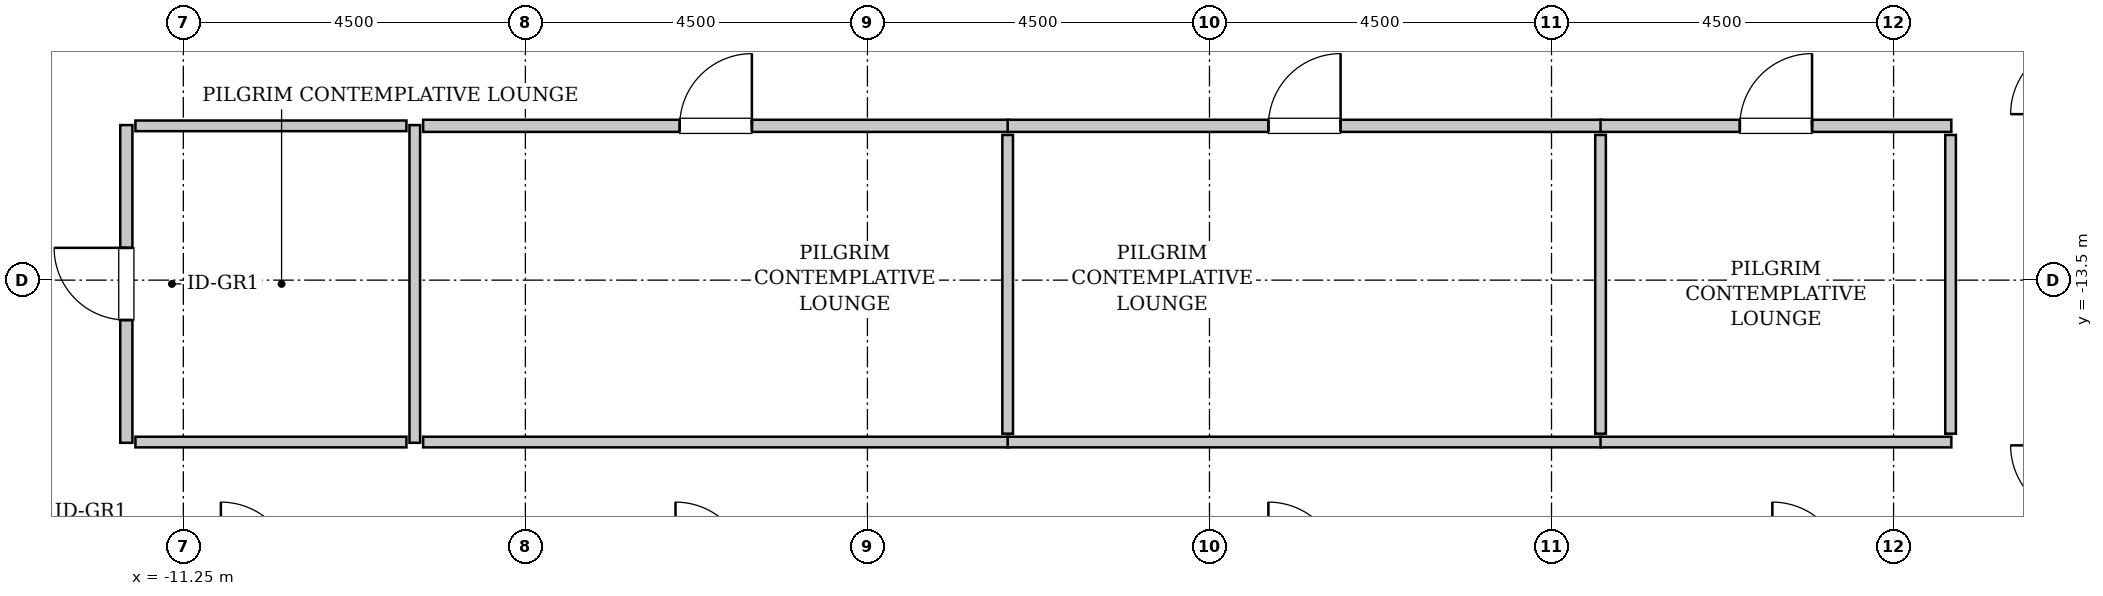
"""IFC4 building model, lengths in metres.
Left out: names, types, materials, properties, quantities, classifications, styles, units other than length and angle.
Written with IfcOpenShell. Run it as: python <this file> out.ifc"""

import sys

from ifc_helpers import new_model, si_unit, direction, frame, frame_2d, origin, place, context, subcontext, project, spatial, rectangle, extrude, source, transform, mapped, element, fill, save


model = new_model("IFC4")
c1 = context("Model", 3, precision=1e-05, world=origin(), true_north=direction((0.0, 1.0)))
c2 = subcontext(c1, "Body", "Model", "MODEL_VIEW")
j1 = project(units=[si_unit("LENGTHUNIT", "METRE"), si_unit("PLANEANGLEUNIT", "RADIAN")], contexts=[c1])
p1 = place(None, origin())
s1 = spatial("IfcSite", under=j1, at=p1, CompositionType="ELEMENT")
p2 = place(p1, origin())
s2 = spatial("IfcBuilding", under=s1, at=p2, CompositionType="ELEMENT")
p3 = place(p2, frame((0.0, 0.0, 214.2)))
s3 = spatial("IfcBuildingStorey", under=s2, at=p3, CompositionType="ELEMENT", Elevation=214.2)
m1 = source(origin(), c2, "Body", "SweptSolid", [
    extrude(rectangle(XDim=4.18, YDim=0.16, at=frame_2d((2.09, 0.0))), origin(), (0.0, 0.0, 1.0), 3.535),
])
p4 = place(p3, frame((-12.0, -15.64, 0.0), z_axis=(0.0, 0.0, 1.0), x_axis=(0.0, 1.0, 0.0)))
e1 = element("IfcWall", 1, at=p4, inside=s3, PredefinedType="PARTITIONING", context=c2, shape_type="MappedRepresentation", body=[
    mapped(m1, transform((0.0, 0.0, 0.0), x_axis=(1.0, 0.0, 0.0), y_axis=(0.0, 1.0, 0.0), z_axis=(0.0, 0.0, 1.0), scale=1.0)),
])
p5 = place(p4, frame((1.615, 0.0, 0.0)))
e2 = element("IfcOpeningElement", 2, at=p5, cuts=e1, PredefinedType="OPENING", context=c2, shape_type="SweptSolid", body=[
    extrude(rectangle(XDim=0.95, YDim=2.1, at=frame_2d((0.475, 1.05))), frame((0.0, 0.09, 0.0), z_axis=(0.0, -1.0, 0.0), x_axis=(1.0, 0.0, 0.0)), (0.0, 0.0, 1.0), 0.18),
])
m2 = source(origin(), c2, "Body", "SweptSolid", [
    extrude(rectangle(XDim=4.18, YDim=0.14, at=frame_2d((2.09, 0.0))), origin(), (0.0, 0.0, 1.0), 3.535),
])
p6 = place(p3, frame((-8.205, -15.64, 0.0), z_axis=(0.0, 0.0, 1.0), x_axis=(0.0, 1.0, 0.0)))
e3 = element("IfcWall", 3, at=p6, inside=s3, PredefinedType="PARTITIONING", context=c2, shape_type="MappedRepresentation", body=[
    mapped(m2, transform((0.0, 0.0, 0.0), x_axis=(1.0, 0.0, 0.0), y_axis=(0.0, 1.0, 0.0), z_axis=(0.0, 0.0, 1.0), scale=1.0)),
])
m3 = source(origin(), c2, "Body", "SweptSolid", [
    extrude(rectangle(XDim=3.565, YDim=0.14, at=frame_2d((1.782, 0.0))), origin(), (0.0, 0.0, 1.0), 3.535),
])
for number, where, z_axis, x_axis in (
    (4, (-11.88, -11.47, 0.0), (0.0, 0.0, 1.0), (1.0, 0.0, 0.0)),
    (5, (-11.88, -15.63, 0.0), (0.0, 0.0, 1.0), (1.0, 0.0, 0.0)),
):
    element("IfcWall", number, at=place(p3, frame(where, z_axis=z_axis, x_axis=x_axis)), inside=s3, PredefinedType="PARTITIONING", context=c2, shape_type="MappedRepresentation", body=[
        mapped(m3, transform((0.0, 0.0, 0.0), x_axis=(1.0, 0.0, 0.0), y_axis=(0.0, 1.0, 0.0), z_axis=(0.0, 0.0, 1.0), scale=1.0)),
    ])
m4 = source(origin(), c2, "Body", "SweptSolid", [
    extrude(rectangle(XDim=7.7, YDim=0.16, at=frame_2d((3.85, 0.0))), origin(), (0.0, 0.0, 1.0), 3.535),
])
p7 = place(p3, frame((-8.095, -11.47, 0.0), z_axis=(0.0, 0.0, 1.0), x_axis=(1.0, 0.0, 0.0)))
e6 = element("IfcWall", 6, at=p7, inside=s3, PredefinedType="PARTITIONING", context=c2, shape_type="MappedRepresentation", body=[
    mapped(m4, transform((0.0, 0.0, 0.0), x_axis=(1.0, 0.0, 0.0), y_axis=(0.0, 1.0, 0.0), z_axis=(0.0, 0.0, 1.0), scale=1.0)),
])
p8 = place(p7, frame((3.375, 0.0, 0.0)))
e7 = element("IfcOpeningElement", 7, at=p8, cuts=e6, PredefinedType="OPENING", context=c2, shape_type="SweptSolid", body=[
    extrude(rectangle(XDim=0.95, YDim=2.1, at=frame_2d((0.475, 1.05))), frame((0.0, 0.09, 0.0), z_axis=(0.0, -1.0, 0.0), x_axis=(1.0, 0.0, 0.0)), (0.0, 0.0, 1.0), 0.18),
])
m5 = source(origin(), c2, "Body", "SweptSolid", [
    extrude(rectangle(XDim=7.7, YDim=0.14, at=frame_2d((3.85, 0.0))), origin(), (0.0, 0.0, 1.0), 3.535),
])
p9 = place(p3, frame((-8.095, -15.63, 0.0), z_axis=(0.0, 0.0, 1.0), x_axis=(1.0, 0.0, 0.0)))
e8 = element("IfcWall", 8, at=p9, inside=s3, PredefinedType="PARTITIONING", context=c2, shape_type="MappedRepresentation", body=[
    mapped(m5, transform((0.0, 0.0, 0.0), x_axis=(1.0, 0.0, 0.0), y_axis=(0.0, 1.0, 0.0), z_axis=(0.0, 0.0, 1.0), scale=1.0)),
])
m6 = source(origin(), c2, "Body", "SweptSolid", [
    extrude(rectangle(XDim=3.93, YDim=0.14, at=frame_2d((1.965, 0.0))), origin(), (0.0, 0.0, 1.0), 3.535),
])
p10 = place(p3, frame((-0.405, -15.52, 0.0), z_axis=(0.0, 0.0, 1.0), x_axis=(0.0, 1.0, 0.0)))
e9 = element("IfcWall", 9, at=p10, inside=s3, PredefinedType="PARTITIONING", context=c2, shape_type="MappedRepresentation", body=[
    mapped(m6, transform((0.0, 0.0, 0.0), x_axis=(1.0, 0.0, 0.0), y_axis=(0.0, 1.0, 0.0), z_axis=(0.0, 0.0, 1.0), scale=1.0)),
])
m7 = source(origin(), c2, "Body", "SweptSolid", [
    extrude(rectangle(XDim=7.81, YDim=0.16, at=frame_2d((3.905, 0.0))), origin(), (0.0, 0.0, 1.0), 3.535),
])
p11 = place(p3, frame((-0.405, -11.47, 0.0), z_axis=(0.0, 0.0, 1.0), x_axis=(1.0, 0.0, 0.0)))
e10 = element("IfcWall", 10, at=p11, inside=s3, PredefinedType="PARTITIONING", context=c2, shape_type="MappedRepresentation", body=[
    mapped(m7, transform((0.0, 0.0, 0.0), x_axis=(1.0, 0.0, 0.0), y_axis=(0.0, 1.0, 0.0), z_axis=(0.0, 0.0, 1.0), scale=1.0)),
])
p12 = place(p11, frame((3.43, 0.0, 0.0)))
e11 = element("IfcOpeningElement", 11, at=p12, cuts=e10, PredefinedType="OPENING", context=c2, shape_type="SweptSolid", body=[
    extrude(rectangle(XDim=0.95, YDim=2.1, at=frame_2d((0.475, 1.05))), frame((0.0, 0.09, 0.0), z_axis=(0.0, -1.0, 0.0), x_axis=(1.0, 0.0, 0.0)), (0.0, 0.0, 1.0), 0.18),
])
m8 = source(origin(), c2, "Body", "SweptSolid", [
    extrude(rectangle(XDim=7.81, YDim=0.14, at=frame_2d((3.905, 0.0))), origin(), (0.0, 0.0, 1.0), 3.535),
])
p13 = place(p3, frame((-0.405, -15.63, 0.0), z_axis=(0.0, 0.0, 1.0), x_axis=(1.0, 0.0, 0.0)))
e12 = element("IfcWall", 12, at=p13, inside=s3, PredefinedType="PARTITIONING", context=c2, shape_type="MappedRepresentation", body=[
    mapped(m8, transform((0.0, 0.0, 0.0), x_axis=(1.0, 0.0, 0.0), y_axis=(0.0, 1.0, 0.0), z_axis=(0.0, 0.0, 1.0), scale=1.0)),
])
p14 = place(p3, frame((7.395, -15.52, 0.0), z_axis=(0.0, 0.0, 1.0), x_axis=(0.0, 1.0, 0.0)))
e13 = element("IfcWall", 13, at=p14, inside=s3, PredefinedType="PARTITIONING", context=c2, shape_type="MappedRepresentation", body=[
    mapped(m6, transform((0.0, 0.0, 0.0), x_axis=(1.0, 0.0, 0.0), y_axis=(0.0, 1.0, 0.0), z_axis=(0.0, 0.0, 1.0), scale=1.0)),
])
m9 = source(origin(), c2, "Body", "SweptSolid", [
    extrude(rectangle(XDim=4.615, YDim=0.16, at=frame_2d((2.308, 0.0))), origin(), (0.0, 0.0, 1.0), 3.535),
])
p15 = place(p3, frame((7.395, -11.47, 0.0), z_axis=(0.0, 0.0, 1.0), x_axis=(1.0, 0.0, 0.0)))
e14 = element("IfcWall", 14, at=p15, inside=s3, PredefinedType="PARTITIONING", context=c2, shape_type="MappedRepresentation", body=[
    mapped(m9, transform((0.0, 0.0, 0.0), x_axis=(1.0, 0.0, 0.0), y_axis=(0.0, 1.0, 0.0), z_axis=(0.0, 0.0, 1.0), scale=1.0)),
])
p16 = place(p15, frame((1.833, 0.0, 0.0)))
e15 = element("IfcOpeningElement", 15, at=p16, cuts=e14, PredefinedType="OPENING", context=c2, shape_type="SweptSolid", body=[
    extrude(rectangle(XDim=0.95, YDim=2.1, at=frame_2d((0.475, 1.05))), frame((0.0, 0.09, 0.0), z_axis=(0.0, -1.0, 0.0), x_axis=(1.0, 0.0, 0.0)), (0.0, 0.0, 1.0), 0.18),
])
m10 = source(origin(), c2, "Body", "SweptSolid", [
    extrude(rectangle(XDim=4.615, YDim=0.14, at=frame_2d((2.308, 0.0))), origin(), (0.0, 0.0, 1.0), 3.535),
])
p17 = place(p3, frame((7.395, -15.63, 0.0), z_axis=(0.0, 0.0, 1.0), x_axis=(1.0, 0.0, 0.0)))
e16 = element("IfcWall", 16, at=p17, inside=s3, PredefinedType="PARTITIONING", context=c2, shape_type="MappedRepresentation", body=[
    mapped(m10, transform((0.0, 0.0, 0.0), x_axis=(1.0, 0.0, 0.0), y_axis=(0.0, 1.0, 0.0), z_axis=(0.0, 0.0, 1.0), scale=1.0)),
])
p18 = place(p3, frame((12.0, -15.52, 0.0), z_axis=(0.0, 0.0, 1.0), x_axis=(0.0, 1.0, 0.0)))
e17 = element("IfcWall", 17, at=p18, inside=s3, PredefinedType="PARTITIONING", context=c2, shape_type="MappedRepresentation", body=[
    mapped(m6, transform((0.0, 0.0, 0.0), x_axis=(1.0, 0.0, 0.0), y_axis=(0.0, 1.0, 0.0), z_axis=(0.0, 0.0, 1.0), scale=1.0)),
])
m11 = source(origin(), c2, "Body", "SweptSolid", [
    extrude(rectangle(XDim=0.95, YDim=2.1, at=frame_2d((0.475, 1.05))), frame((0.0, 0.025, 0.0), z_axis=(0.0, -1.0, 0.0), x_axis=(1.0, 0.0, 0.0)), (0.0, 0.0, 1.0), 0.05),
])
p19 = place(p5, origin())
e18 = element("IfcDoor", 18, at=p19, inside=s3, OperationType="SINGLE_SWING_RIGHT", PredefinedType="DOOR", context=c2, shape_type="MappedRepresentation", body=[
    mapped(m11, transform((0.0, 0.0, 0.0), x_axis=(1.0, 0.0, 0.0), y_axis=(0.0, 1.0, 0.0), z_axis=(0.0, 0.0, 1.0), scale=1.0)),
])
fill(e2, e18)
p20 = place(p8, origin())
e19 = element("IfcDoor", 19, at=p20, inside=s3, OperationType="SINGLE_SWING_RIGHT", PredefinedType="DOOR", context=c2, shape_type="MappedRepresentation", body=[
    mapped(m11, transform((0.0, 0.0, 0.0), x_axis=(1.0, 0.0, 0.0), y_axis=(0.0, 1.0, 0.0), z_axis=(0.0, 0.0, 1.0), scale=1.0)),
])
fill(e7, e19)
p21 = place(p12, origin())
e20 = element("IfcDoor", 20, at=p21, inside=s3, OperationType="SINGLE_SWING_RIGHT", PredefinedType="DOOR", context=c2, shape_type="MappedRepresentation", body=[
    mapped(m11, transform((0.0, 0.0, 0.0), x_axis=(1.0, 0.0, 0.0), y_axis=(0.0, 1.0, 0.0), z_axis=(0.0, 0.0, 1.0), scale=1.0)),
])
fill(e11, e20)
p22 = place(p16, origin())
e21 = element("IfcDoor", 21, at=p22, inside=s3, OperationType="SINGLE_SWING_RIGHT", PredefinedType="DOOR", context=c2, shape_type="MappedRepresentation", body=[
    mapped(m11, transform((0.0, 0.0, 0.0), x_axis=(1.0, 0.0, 0.0), y_axis=(0.0, 1.0, 0.0), z_axis=(0.0, 0.0, 1.0), scale=1.0)),
])
fill(e15, e21)
save(model, sys.argv[1])
